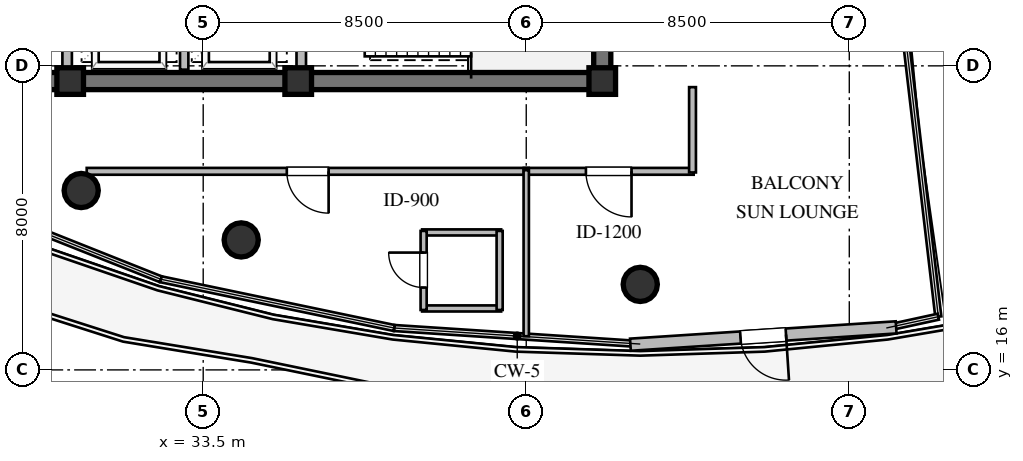
"""IFC4 building model, lengths in metres.
Left out: names, types, materials, properties, quantities, classifications, styles, units other than length and angle.
Written with IfcOpenShell. Run it as: python <this file> out.ifc"""

import sys

from ifc_helpers import new_model, si_unit, direction, frame, frame_2d, origin, origin_2d, place, context, subcontext, project, spatial, rectangle, circle, extrude, element, fill, save


model = new_model("IFC4")
c1 = context("Model", 3, precision=1e-05, world=origin(), true_north=direction((0.0, 1.0)))
c2 = subcontext(c1, "Body", "Model", "MODEL_VIEW")
j1 = project(units=[si_unit("LENGTHUNIT", "METRE"), si_unit("PLANEANGLEUNIT", "RADIAN")], contexts=[c1])
p1 = place(None, origin())
s1 = spatial("IfcSite", under=j1, at=p1, CompositionType="ELEMENT")
p2 = place(p1, origin())
s2 = spatial("IfcBuilding", under=s1, at=p2, CompositionType="ELEMENT")
p3 = place(p2, frame((0.0, 0.0, 277.6)))
s3 = spatial("IfcBuildingStorey", under=s2, at=p3, CompositionType="ELEMENT", Elevation=277.6)
p4 = place(p3, frame((21.775, 23.6, 0.0), z_axis=(0.0, 0.0, 1.0), x_axis=(1.0, 0.0, 0.0)))
e1 = element("IfcWall", 1, at=p4, inside=s3, PredefinedType="SHEAR", context=c2, shape_type="SweptSolid", body=[
    extrude(rectangle(XDim=22.45, YDim=0.45, at=frame_2d((11.225, 0.0))), origin(), (0.0, 0.0, 1.0), 3.48),
])
p5 = place(p3, frame((44.0, 23.825, 0.0), z_axis=(0.0, 0.0, 1.0), x_axis=(0.0, 1.0, 0.0)))
e2 = element("IfcWall", 2, at=p5, inside=s3, PredefinedType="SHEAR", context=c2, shape_type="SweptSolid", body=[
    extrude(rectangle(XDim=12.35, YDim=0.45, at=frame_2d((6.175, 0.0))), origin(), (0.0, 0.0, 1.0), 3.48),
])
p6 = place(p5, frame((8.675, 0.0, 0.0)))
e3 = element("IfcOpeningElement", 3, at=p6, cuts=e2, PredefinedType="OPENING", context=c2, shape_type="SweptSolid", body=[
    extrude(rectangle(XDim=1.5, YDim=2.15, at=frame_2d((0.75, 1.075))), frame((0.0, 0.235, 0.0), z_axis=(0.0, -1.0, 0.0), x_axis=(1.0, 0.0, 0.0)), (0.0, 0.0, 1.0), 0.47),
])
for number, where, z_axis, x_axis in (
    (4, (30.0, 23.6, 0.0), (0.0, 0.0, 1.0), (1.0, 0.0, 0.0)),
    (5, (36.0, 23.6, 0.0), (0.0, 0.0, 1.0), (1.0, 0.0, 0.0)),
    (6, (44.0, 23.6, 0.0), (0.0, 0.0, 1.0), (1.0, 0.0, 0.0)),
):
    element("IfcColumn", number, at=place(p3, frame(where, z_axis=z_axis, x_axis=x_axis)), inside=s3, PredefinedType="COLUMN", context=c2, shape_type="SweptSolid", body=[
        extrude(rectangle(XDim=0.7, YDim=0.7, at=origin_2d()), origin(), (0.0, 0.0, 1.0), 3.8),
    ])
for number, where, z_axis, x_axis in (
    (7, (30.29, 20.72, 0.0), (0.0, 0.0, 1.0), (1.0, 0.0, 0.0)),
    (8, (34.5, 19.42, 0.0), (0.0, 0.0, 1.0), (1.0, 0.0, 0.0)),
    (9, (45.0, 18.25, 0.0), (0.0, 0.0, 1.0), (1.0, 0.0, 0.0)),
):
    element("IfcColumn", number, at=place(p3, frame(where, z_axis=z_axis, x_axis=x_axis)), inside=s3, PredefinedType="COLUMN", context=c2, shape_type="SweptSolid", body=[
        extrude(circle(Radius=0.45, at=origin_2d()), origin(), (0.0, 0.0, 1.0), 3.8),
    ])
p7 = place(p3, frame((51.733, 17.119, 0.0), z_axis=(0.0, 0.0, 1.0), x_axis=(-0.997881827293, -0.065052738278, 0.0)))
e10 = element("IfcWall", 10, at=p7, inside=s3, PredefinedType="STANDARD", context=c2, shape_type="SweptSolid", body=[
    extrude(rectangle(XDim=7.007, YDim=0.32, at=frame_2d((3.503, 0.0))), origin(), (0.0, 0.0, 1.0), 3.48),
])
p8 = place(p7, frame((2.904, 0.0, 0.0)))
e11 = element("IfcOpeningElement", 11, at=p8, cuts=e10, PredefinedType="OPENING", context=c2, shape_type="SweptSolid", body=[
    extrude(rectangle(XDim=1.2, YDim=2.15, at=frame_2d((0.6, 1.075))), frame((0.0, 0.17, 0.0), z_axis=(0.0, -1.0, 0.0), x_axis=(1.0, 0.0, 0.0)), (0.0, 0.0, 1.0), 0.34),
])
p9 = place(p3, frame((29.92, 23.9, 0.0), z_axis=(0.0, 0.0, 1.0), x_axis=(0.0, 1.0, 0.0)))
e12 = element("IfcWall", 12, at=p9, inside=s3, PredefinedType="SOLIDWALL", context=c2, shape_type="SweptSolid", body=[
    extrude(rectangle(XDim=5.4, YDim=0.25, at=frame_2d((2.7, 0.0))), origin(), (0.0, 0.0, 1.0), 3.01),
])
p10 = place(p9, frame((3.421, 0.0, 0.0)))
e13 = element("IfcOpeningElement", 13, at=p10, cuts=e12, PredefinedType="OPENING", context=c2, shape_type="SweptSolid", body=[
    extrude(rectangle(XDim=1.15, YDim=2.1, at=frame_2d((0.575, 1.05))), frame((0.0, 0.135, 0.0), z_axis=(0.0, -1.0, 0.0), x_axis=(1.0, 0.0, 0.0)), (0.0, 0.0, 1.0), 0.27),
])
p11 = place(p3, frame((36.08, 23.9, 0.0), z_axis=(0.0, 0.0, 1.0), x_axis=(0.0, 1.0, 0.0)))
e14 = element("IfcWall", 14, at=p11, inside=s3, PredefinedType="SOLIDWALL", context=c2, shape_type="SweptSolid", body=[
    extrude(rectangle(XDim=5.4, YDim=0.25, at=frame_2d((2.7, 0.0))), origin(), (0.0, 0.0, 1.0), 3.48),
])
p12 = place(p11, frame((3.421, 0.0, 0.0)))
e15 = element("IfcOpeningElement", 15, at=p12, cuts=e14, PredefinedType="OPENING", context=c2, shape_type="SweptSolid", body=[
    extrude(rectangle(XDim=1.15, YDim=2.1, at=frame_2d((0.575, 1.05))), frame((0.0, 0.135, 0.0), z_axis=(0.0, -1.0, 0.0), x_axis=(1.0, 0.0, 0.0)), (0.0, 0.0, 1.0), 0.27),
])
p13 = place(p3, frame((33.0, 23.9, 0.0), z_axis=(0.0, 0.0, 1.0), x_axis=(0.0, 1.0, 0.0)))
e16 = element("IfcWall", 16, at=p13, inside=s3, PredefinedType="SOLIDWALL", context=c2, shape_type="SweptSolid", body=[
    extrude(rectangle(XDim=2.72, YDim=0.22, at=frame_2d((1.36, 0.0))), origin(), (0.0, 0.0, 1.0), 3.48),
])
for number, where, z_axis, x_axis in (
    (17, (39.26, 17.617, 0.0), (0.0, 0.0, 1.0), (1.0, 0.0, 0.0)),
    (18, (39.26, 19.617, 0.0), (0.0, 0.0, 1.0), (1.0, 0.0, 0.0)),
):
    element("IfcWall", number, at=place(p3, frame(where, z_axis=z_axis, x_axis=x_axis)), inside=s3, PredefinedType="PLUMBINGWALL", context=c2, shape_type="SweptSolid", body=[
        extrude(rectangle(XDim=2.08, YDim=0.16, at=frame_2d((1.04, 0.0))), origin(), (0.0, 0.0, 1.0), 3.48),
    ])
p14 = place(p3, frame((39.3, 17.577, 0.0), z_axis=(0.0, 0.0, 1.0), x_axis=(0.0, 1.0, 0.0)))
e19 = element("IfcWall", 19, at=p14, inside=s3, PredefinedType="PLUMBINGWALL", context=c2, shape_type="SweptSolid", body=[
    extrude(rectangle(XDim=2.08, YDim=0.16, at=frame_2d((1.04, 0.0))), origin(), (0.0, 0.0, 1.0), 3.48),
])
p15 = place(p14, frame((0.59, 0.0, 0.0)))
e20 = element("IfcOpeningElement", 20, at=p15, cuts=e19, PredefinedType="OPENING", context=c2, shape_type="SweptSolid", body=[
    extrude(rectangle(XDim=0.92, YDim=2.1, at=frame_2d((0.46, 1.05))), frame((0.0, 0.09, 0.0), z_axis=(0.0, -1.0, 0.0), x_axis=(1.0, 0.0, 0.0)), (0.0, 0.0, 1.0), 0.18),
])
p16 = place(p3, frame((41.3, 17.577, 0.0), z_axis=(0.0, 0.0, 1.0), x_axis=(0.0, 1.0, 0.0)))
e21 = element("IfcWall", 21, at=p16, inside=s3, PredefinedType="PLUMBINGWALL", context=c2, shape_type="SweptSolid", body=[
    extrude(rectangle(XDim=2.08, YDim=0.16, at=frame_2d((1.04, 0.0))), origin(), (0.0, 0.0, 1.0), 3.48),
])
p17 = place(p3, frame((42.065, 21.225, 0.0), z_axis=(0.0, 0.0, 1.0), x_axis=(-1.0, 0.0, 0.0)))
e22 = element("IfcWall", 22, at=p17, inside=s3, PredefinedType="PARTITIONING", context=c2, shape_type="SweptSolid", body=[
    extrude(rectangle(XDim=11.63, YDim=0.18, at=frame_2d((5.815, 0.0))), origin(), (0.0, 0.0, 1.0), 2.937),
])
p18 = place(p17, frame((5.265, 0.0, 0.0)))
e23 = element("IfcOpeningElement", 23, at=p18, cuts=e22, PredefinedType="OPENING", context=c2, shape_type="SweptSolid", body=[
    extrude(rectangle(XDim=1.1, YDim=2.1, at=frame_2d((0.55, 1.05))), frame((0.0, 0.1, 0.0), z_axis=(0.0, -1.0, 0.0), x_axis=(1.0, 0.0, 0.0)), (0.0, 0.0, 1.0), 0.2),
])
p19 = place(p3, frame((46.405, 21.225, 0.0), z_axis=(0.0, 0.0, 1.0), x_axis=(-1.0, 0.0, 0.0)))
e24 = element("IfcWall", 24, at=p19, inside=s3, PredefinedType="PARTITIONING", context=c2, shape_type="SweptSolid", body=[
    extrude(rectangle(XDim=4.47, YDim=0.18, at=frame_2d((2.235, 0.0))), origin(), (0.0, 0.0, 1.0), 3.116),
])
p20 = place(p19, frame((1.635, 0.0, 0.0)))
e25 = element("IfcOpeningElement", 25, at=p20, cuts=e24, PredefinedType="OPENING", context=c2, shape_type="SweptSolid", body=[
    extrude(rectangle(XDim=1.2, YDim=2.15, at=frame_2d((0.6, 1.075))), frame((0.0, 0.1, 0.0), z_axis=(0.0, -1.0, 0.0), x_axis=(1.0, 0.0, 0.0)), (0.0, 0.0, 1.0), 0.2),
])
p21 = place(p3, frame((46.375, 23.44, 0.0), z_axis=(0.0, 0.0, 1.0), x_axis=(0.0, -1.0, 0.0)))
e26 = element("IfcWall", 26, at=p21, inside=s3, PredefinedType="PARTITIONING", context=c2, shape_type="SweptSolid", body=[
    extrude(rectangle(XDim=2.245, YDim=0.18, at=frame_2d((1.123, 0.0))), origin(), (0.0, 0.0, 1.0), 3.48),
])
p22 = place(p3, frame((42.0, 21.255, 0.0), z_axis=(0.0, 0.0, 1.0), x_axis=(0.0, -1.0, 0.0)))
e27 = element("IfcWall", 27, at=p22, inside=s3, PredefinedType="PARTITIONING", context=c2, shape_type="SweptSolid", body=[
    extrude(rectangle(XDim=4.369, YDim=0.14, at=frame_2d((2.185, 0.0))), origin(), (0.0, 0.0, 1.0), 3.48),
])
p23 = place(p8, origin())
e28 = element("IfcDoor", 28, at=p23, inside=s3, OperationType="SINGLE_SWING_LEFT", PredefinedType="DOOR", context=c2, shape_type="SweptSolid", body=[
    extrude(rectangle(XDim=1.2, YDim=2.15, at=frame_2d((0.6, 1.075))), frame((0.0, 0.025, 0.0), z_axis=(0.0, -1.0, 0.0), x_axis=(1.0, 0.0, 0.0)), (0.0, 0.0, 1.0), 0.05),
])
fill(e11, e28)
p24 = place(p15, origin())
e29 = element("IfcDoor", 29, at=p24, inside=s3, OperationType="SINGLE_SWING_RIGHT", PredefinedType="DOOR", context=c2, shape_type="SweptSolid", body=[
    extrude(rectangle(XDim=0.92, YDim=2.1, at=frame_2d((0.46, 1.05))), frame((0.0, 0.025, 0.0), z_axis=(0.0, -1.0, 0.0), x_axis=(1.0, 0.0, 0.0)), (0.0, 0.0, 1.0), 0.05),
])
fill(e20, e29)
p25 = place(p18, origin())
e30 = element("IfcDoor", 30, at=p25, inside=s3, OperationType="SINGLE_SWING_LEFT", PredefinedType="DOOR", context=c2, shape_type="SweptSolid", body=[
    extrude(rectangle(XDim=1.1, YDim=2.1, at=frame_2d((0.55, 1.05))), frame((0.0, 0.025, 0.0), z_axis=(0.0, -1.0, 0.0), x_axis=(1.0, 0.0, 0.0)), (0.0, 0.0, 1.0), 0.05),
])
fill(e23, e30)
p26 = place(p20, origin())
e31 = element("IfcDoor", 31, at=p26, inside=s3, OperationType="SINGLE_SWING_LEFT", PredefinedType="DOOR", context=c2, shape_type="SweptSolid", body=[
    extrude(rectangle(XDim=1.2, YDim=2.15, at=frame_2d((0.6, 1.075))), frame((0.0, 0.025, 0.0), z_axis=(0.0, -1.0, 0.0), x_axis=(1.0, 0.0, 0.0)), (0.0, 0.0, 1.0), 0.05),
])
fill(e25, e31)
save(model, sys.argv[1])
